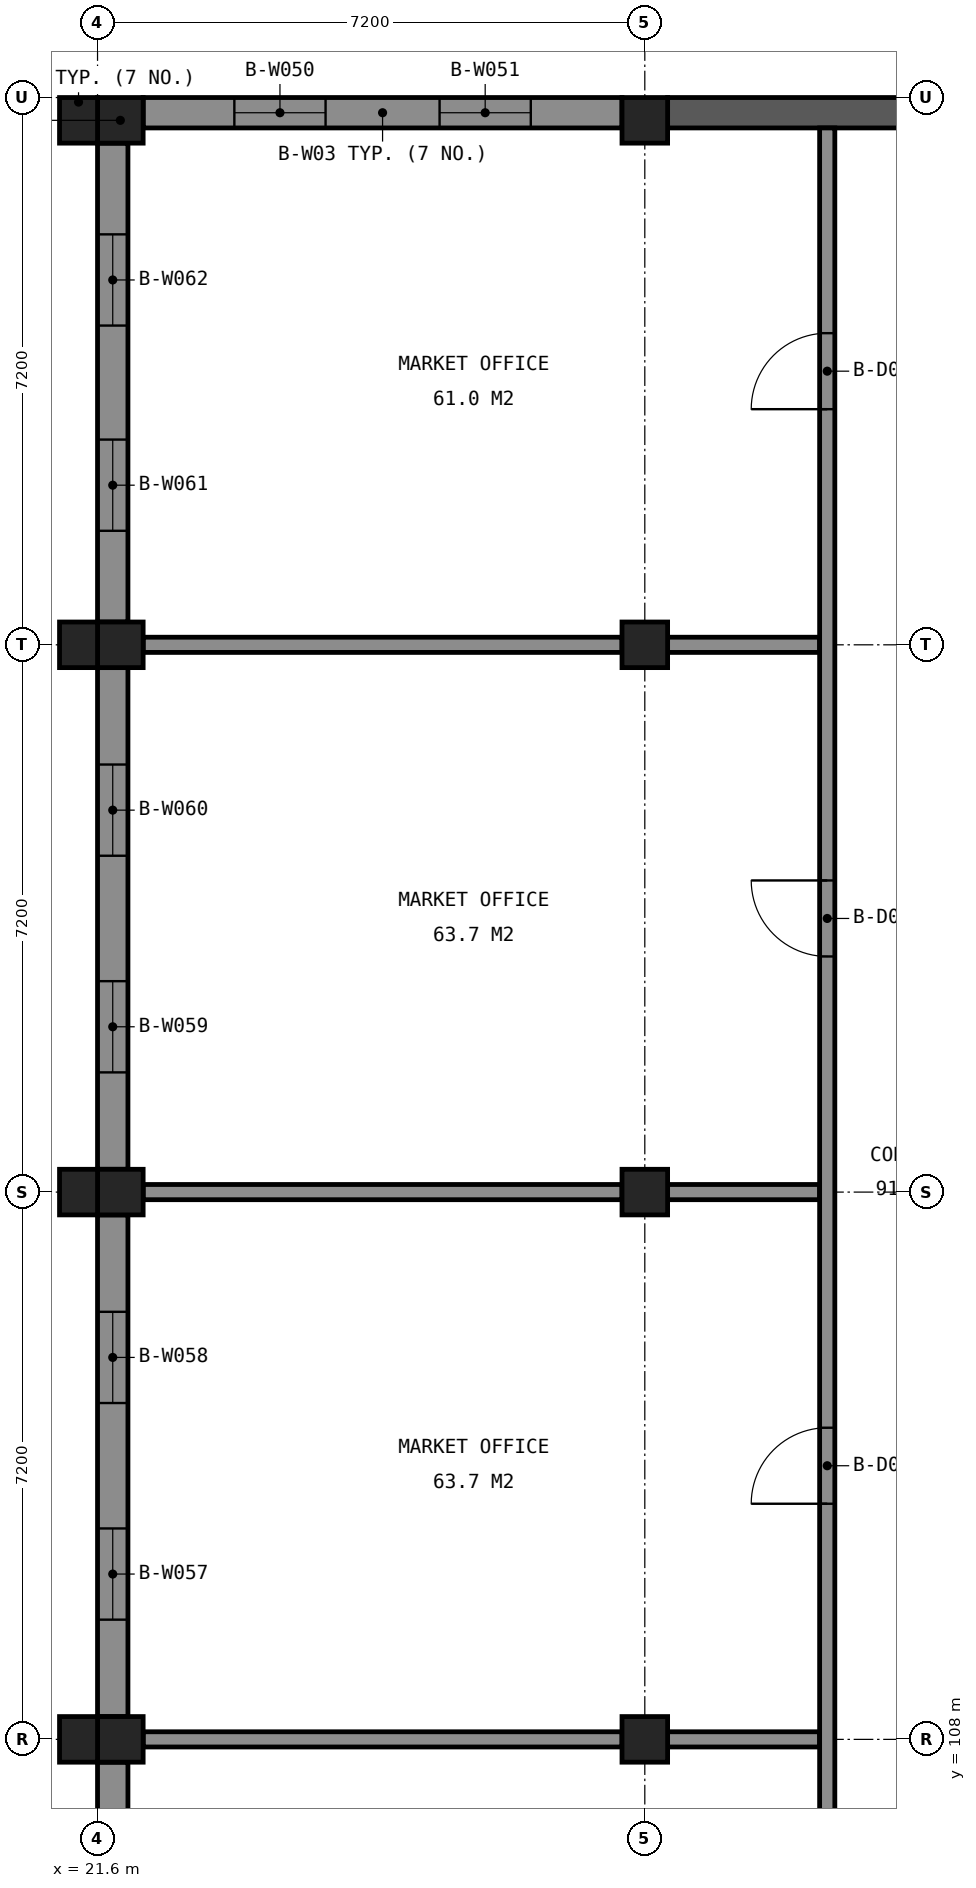
"""IFC4 building model, lengths in metres.
Left out: names, types, materials, properties, quantities, classifications, styles, units other than length and angle.
Written with IfcOpenShell. Run it as: python <this file> out.ifc"""

import sys

from ifc_helpers import new_model, si_unit, direction, frame, frame_2d, origin, origin_2d, place, context, subcontext, project, spatial, rectangle, extrude, element, fill, save


model = new_model("IFC4")
c1 = context("Model", 3, precision=1e-05, world=origin(), true_north=direction((0.0, 1.0)))
c2 = subcontext(c1, "Body", "Model", "MODEL_VIEW")
j1 = project(units=[si_unit("LENGTHUNIT", "METRE"), si_unit("PLANEANGLEUNIT", "RADIAN")], contexts=[c1])
p1 = place(None, origin())
s1 = spatial("IfcSite", under=j1, at=p1, CompositionType="ELEMENT")
p2 = place(p1, origin())
s2 = spatial("IfcBuilding", under=s1, at=p2, CompositionType="ELEMENT")
p3 = place(p2, frame((0.0, 0.0, 14.4)))
s3 = spatial("IfcBuildingStorey", under=s2, at=p3, CompositionType="ELEMENT", Elevation=14.4)
for number, where, z_axis, x_axis in (
    (1, (21.9, 129.3, 0.0), (0.0, 0.0, 1.0), (1.0, 0.0, 0.0)),
    (2, (21.9, 122.4, 0.0), (0.0, 0.0, 1.0), (1.0, 0.0, 0.0)),
    (3, (21.9, 115.2, 0.0), (0.0, 0.0, 1.0), (1.0, 0.0, 0.0)),
    (4, (21.9, 108.0, 0.0), (0.0, 0.0, 1.0), (1.0, 0.0, 0.0)),
    (5, (28.8, 129.3, 0.0), (0.0, 0.0, 1.0), (1.0, 0.0, 0.0)),
):
    element("IfcColumn", number, at=place(p3, frame(where, z_axis=z_axis, x_axis=x_axis)), inside=s3, PredefinedType="COLUMN", context=c2, shape_type="SweptSolid", body=[
        extrude(rectangle(XDim=0.6, YDim=0.6, at=origin_2d()), origin(), (0.0, 0.0, 1.0), 4.138),
    ])
for number, where, z_axis, x_axis in (
    (6, (28.8, 122.4, 0.0), (0.0, 0.0, 1.0), (1.0, 0.0, 0.0)),
    (7, (28.8, 115.2, 0.0), (0.0, 0.0, 1.0), (1.0, 0.0, 0.0)),
    (8, (28.8, 108.0, 0.0), (0.0, 0.0, 1.0), (1.0, 0.0, 0.0)),
):
    element("IfcColumn", number, at=place(p3, frame(where, z_axis=z_axis, x_axis=x_axis)), inside=s3, PredefinedType="COLUMN", context=c2, shape_type="SweptSolid", body=[
        extrude(rectangle(XDim=0.6, YDim=0.6, at=origin_2d()), origin(), (0.0, 0.0, 1.0), 4.713),
    ])
p4 = place(p3, frame((29.1, 129.4, 0.0), z_axis=(0.0, 0.0, 1.0), x_axis=(1.0, 0.0, 0.0)))
e9 = element("IfcWall", 9, at=p4, inside=s3, PredefinedType="SHEAR", context=c2, shape_type="SweptSolid", body=[
    extrude(rectangle(XDim=13.7, YDim=0.4, at=frame_2d((6.85, 0.0))), origin(), (0.0, 0.0, 1.0), 3.9),
])
p5 = place(p3, frame((22.2, 129.4, 0.0), z_axis=(0.0, 0.0, 1.0), x_axis=(1.0, 0.0, 0.0)))
e10 = element("IfcWall", 10, at=p5, inside=s3, PredefinedType="SOLIDWALL", context=c2, shape_type="SweptSolid", body=[
    extrude(rectangle(XDim=6.3, YDim=0.4, at=frame_2d((3.15, 0.0))), origin(), (0.0, 0.0, 1.0), 4.129),
])
p6 = place(p5, frame((1.2, 0.0, 1.6)))
e11 = element("IfcOpeningElement", 11, at=p6, cuts=e10, PredefinedType="OPENING", context=c2, shape_type="SweptSolid", body=[
    extrude(rectangle(XDim=1.2, YDim=1.2, at=frame_2d((0.6, 0.6))), frame((0.0, 0.21, 0.0), z_axis=(0.0, -1.0, 0.0), x_axis=(1.0, 0.0, 0.0)), (0.0, 0.0, 1.0), 0.42),
])
p7 = place(p5, frame((3.9, 0.0, 1.6)))
e12 = element("IfcOpeningElement", 12, at=p7, cuts=e10, PredefinedType="OPENING", context=c2, shape_type="SweptSolid", body=[
    extrude(rectangle(XDim=1.2, YDim=1.2, at=frame_2d((0.6, 0.6))), frame((0.0, 0.21, 0.0), z_axis=(0.0, -1.0, 0.0), x_axis=(1.0, 0.0, 0.0)), (0.0, 0.0, 1.0), 0.42),
])
p8 = place(p3, frame((21.8, 101.1, 0.0), z_axis=(0.0, 0.0, 1.0), x_axis=(0.0, 1.0, 0.0)))
e13 = element("IfcWall", 13, at=p8, inside=s3, PredefinedType="SOLIDWALL", context=c2, shape_type="SweptSolid", body=[
    extrude(rectangle(XDim=6.6, YDim=0.4, at=frame_2d((3.3, 0.0))), origin(), (0.0, 0.0, 1.0), 4.129),
])
p9 = place(p8, frame((1.275, 0.0, 1.6)))
e14 = element("IfcOpeningElement", 14, at=p9, cuts=e13, PredefinedType="OPENING", context=c2, shape_type="SweptSolid", body=[
    extrude(rectangle(XDim=1.2, YDim=1.2, at=frame_2d((0.6, 0.6))), frame((0.0, 0.21, 0.0), z_axis=(0.0, -1.0, 0.0), x_axis=(1.0, 0.0, 0.0)), (0.0, 0.0, 1.0), 0.42),
])
p10 = place(p8, frame((4.125, 0.0, 1.6)))
e15 = element("IfcOpeningElement", 15, at=p10, cuts=e13, PredefinedType="OPENING", context=c2, shape_type="SweptSolid", body=[
    extrude(rectangle(XDim=1.2, YDim=1.2, at=frame_2d((0.6, 0.6))), frame((0.0, 0.21, 0.0), z_axis=(0.0, -1.0, 0.0), x_axis=(1.0, 0.0, 0.0)), (0.0, 0.0, 1.0), 0.42),
])
p11 = place(p3, frame((21.8, 108.3, 0.0), z_axis=(0.0, 0.0, 1.0), x_axis=(0.0, 1.0, 0.0)))
e16 = element("IfcWall", 16, at=p11, inside=s3, PredefinedType="SOLIDWALL", context=c2, shape_type="SweptSolid", body=[
    extrude(rectangle(XDim=6.6, YDim=0.4, at=frame_2d((3.3, 0.0))), origin(), (0.0, 0.0, 1.0), 4.129),
])
p12 = place(p11, frame((1.275, 0.0, 1.6)))
e17 = element("IfcOpeningElement", 17, at=p12, cuts=e16, PredefinedType="OPENING", context=c2, shape_type="SweptSolid", body=[
    extrude(rectangle(XDim=1.2, YDim=1.2, at=frame_2d((0.6, 0.6))), frame((0.0, 0.21, 0.0), z_axis=(0.0, -1.0, 0.0), x_axis=(1.0, 0.0, 0.0)), (0.0, 0.0, 1.0), 0.42),
])
p13 = place(p11, frame((4.125, 0.0, 1.6)))
e18 = element("IfcOpeningElement", 18, at=p13, cuts=e16, PredefinedType="OPENING", context=c2, shape_type="SweptSolid", body=[
    extrude(rectangle(XDim=1.2, YDim=1.2, at=frame_2d((0.6, 0.6))), frame((0.0, 0.21, 0.0), z_axis=(0.0, -1.0, 0.0), x_axis=(1.0, 0.0, 0.0)), (0.0, 0.0, 1.0), 0.42),
])
p14 = place(p3, frame((21.8, 115.5, 0.0), z_axis=(0.0, 0.0, 1.0), x_axis=(0.0, 1.0, 0.0)))
e19 = element("IfcWall", 19, at=p14, inside=s3, PredefinedType="SOLIDWALL", context=c2, shape_type="SweptSolid", body=[
    extrude(rectangle(XDim=6.6, YDim=0.4, at=frame_2d((3.3, 0.0))), origin(), (0.0, 0.0, 1.0), 4.129),
])
p15 = place(p14, frame((1.275, 0.0, 1.6)))
e20 = element("IfcOpeningElement", 20, at=p15, cuts=e19, PredefinedType="OPENING", context=c2, shape_type="SweptSolid", body=[
    extrude(rectangle(XDim=1.2, YDim=1.2, at=frame_2d((0.6, 0.6))), frame((0.0, 0.21, 0.0), z_axis=(0.0, -1.0, 0.0), x_axis=(1.0, 0.0, 0.0)), (0.0, 0.0, 1.0), 0.42),
])
p16 = place(p14, frame((4.125, 0.0, 1.6)))
e21 = element("IfcOpeningElement", 21, at=p16, cuts=e19, PredefinedType="OPENING", context=c2, shape_type="SweptSolid", body=[
    extrude(rectangle(XDim=1.2, YDim=1.2, at=frame_2d((0.6, 0.6))), frame((0.0, 0.21, 0.0), z_axis=(0.0, -1.0, 0.0), x_axis=(1.0, 0.0, 0.0)), (0.0, 0.0, 1.0), 0.42),
])
p17 = place(p3, frame((21.8, 122.7, 0.0), z_axis=(0.0, 0.0, 1.0), x_axis=(0.0, 1.0, 0.0)))
e22 = element("IfcWall", 22, at=p17, inside=s3, PredefinedType="SOLIDWALL", context=c2, shape_type="SweptSolid", body=[
    extrude(rectangle(XDim=6.3, YDim=0.4, at=frame_2d((3.15, 0.0))), origin(), (0.0, 0.0, 1.0), 4.129),
])
p18 = place(p17, frame((1.2, 0.0, 1.6)))
e23 = element("IfcOpeningElement", 23, at=p18, cuts=e22, PredefinedType="OPENING", context=c2, shape_type="SweptSolid", body=[
    extrude(rectangle(XDim=1.2, YDim=1.2, at=frame_2d((0.6, 0.6))), frame((0.0, 0.21, 0.0), z_axis=(0.0, -1.0, 0.0), x_axis=(1.0, 0.0, 0.0)), (0.0, 0.0, 1.0), 0.42),
])
p19 = place(p17, frame((3.9, 0.0, 1.6)))
e24 = element("IfcOpeningElement", 24, at=p19, cuts=e22, PredefinedType="OPENING", context=c2, shape_type="SweptSolid", body=[
    extrude(rectangle(XDim=1.2, YDim=1.2, at=frame_2d((0.6, 0.6))), frame((0.0, 0.21, 0.0), z_axis=(0.0, -1.0, 0.0), x_axis=(1.0, 0.0, 0.0)), (0.0, 0.0, 1.0), 0.42),
])
for number, where, z_axis, x_axis in (
    (25, (21.35, 108.0, 0.0), (0.0, 0.0, 1.0), (1.0, 0.0, 0.0)),
    (26, (21.35, 115.2, 0.0), (0.0, 0.0, 1.0), (1.0, 0.0, 0.0)),
    (27, (21.35, 122.4, 0.0), (0.0, 0.0, 1.0), (1.0, 0.0, 0.0)),
    (28, (21.35, 129.3, 0.0), (0.0, 0.0, 1.0), (1.0, 0.0, 0.0)),
):
    element("IfcColumn", number, at=place(p3, frame(where, z_axis=z_axis, x_axis=x_axis)), inside=s3, PredefinedType="COLUMN", context=c2, shape_type="SweptSolid", body=[
        extrude(rectangle(XDim=0.5, YDim=0.6, at=origin_2d()), origin(), (0.0, 0.0, 1.0), 3.8),
    ])
p20 = place(p3, frame((22.2, 108.0, 0.0), z_axis=(0.0, 0.0, 1.0), x_axis=(1.0, 0.0, 0.0)))
e29 = element("IfcWall", 29, at=p20, inside=s3, PredefinedType="PARTITIONING", context=c2, shape_type="SweptSolid", body=[
    extrude(rectangle(XDim=6.3, YDim=0.2, at=frame_2d((3.15, 0.0))), origin(), (0.0, 0.0, 1.0), 4.0),
])
p21 = place(p3, frame((29.1, 108.0, 0.0), z_axis=(0.0, 0.0, 1.0), x_axis=(1.0, 0.0, 0.0)))
e30 = element("IfcWall", 30, at=p21, inside=s3, PredefinedType="PARTITIONING", context=c2, shape_type="SweptSolid", body=[
    extrude(rectangle(XDim=2.0, YDim=0.2, at=frame_2d((1.0, 0.0))), origin(), (0.0, 0.0, 1.0), 4.0),
])
p22 = place(p3, frame((22.2, 115.2, 0.0), z_axis=(0.0, 0.0, 1.0), x_axis=(1.0, 0.0, 0.0)))
e31 = element("IfcWall", 31, at=p22, inside=s3, PredefinedType="PARTITIONING", context=c2, shape_type="SweptSolid", body=[
    extrude(rectangle(XDim=6.3, YDim=0.2, at=frame_2d((3.15, 0.0))), origin(), (0.0, 0.0, 1.0), 4.0),
])
p23 = place(p3, frame((29.1, 115.2, 0.0), z_axis=(0.0, 0.0, 1.0), x_axis=(1.0, 0.0, 0.0)))
e32 = element("IfcWall", 32, at=p23, inside=s3, PredefinedType="PARTITIONING", context=c2, shape_type="SweptSolid", body=[
    extrude(rectangle(XDim=2.0, YDim=0.2, at=frame_2d((1.0, 0.0))), origin(), (0.0, 0.0, 1.0), 4.0),
])
p24 = place(p3, frame((22.2, 122.4, 0.0), z_axis=(0.0, 0.0, 1.0), x_axis=(1.0, 0.0, 0.0)))
e33 = element("IfcWall", 33, at=p24, inside=s3, PredefinedType="PARTITIONING", context=c2, shape_type="SweptSolid", body=[
    extrude(rectangle(XDim=6.3, YDim=0.2, at=frame_2d((3.15, 0.0))), origin(), (0.0, 0.0, 1.0), 4.0),
])
p25 = place(p3, frame((29.1, 122.4, 0.0), z_axis=(0.0, 0.0, 1.0), x_axis=(1.0, 0.0, 0.0)))
e34 = element("IfcWall", 34, at=p25, inside=s3, PredefinedType="PARTITIONING", context=c2, shape_type="SweptSolid", body=[
    extrude(rectangle(XDim=2.0, YDim=0.2, at=frame_2d((1.0, 0.0))), origin(), (0.0, 0.0, 1.0), 4.0),
])
p26 = place(p3, frame((31.2, 86.8, 0.0), z_axis=(0.0, 0.0, 1.0), x_axis=(0.0, 1.0, 0.0)))
e35 = element("IfcWall", 35, at=p26, inside=s3, PredefinedType="PARTITIONING", context=c2, shape_type="SweptSolid", body=[
    extrude(rectangle(XDim=42.4, YDim=0.2, at=frame_2d((21.2, 0.0))), origin(), (0.0, 0.0, 1.0), 4.0),
])
p27 = place(p26, frame((38.7, 0.0, 0.0)))
e36 = element("IfcOpeningElement", 36, at=p27, cuts=e35, PredefinedType="OPENING", context=c2, shape_type="SweptSolid", body=[
    extrude(rectangle(XDim=1.0, YDim=2.1, at=frame_2d((0.5, 1.05))), frame((0.0, 0.11, 0.0), z_axis=(0.0, -1.0, 0.0), x_axis=(1.0, 0.0, 0.0)), (0.0, 0.0, 1.0), 0.22),
])
p28 = place(p26, frame((31.5, 0.0, 0.0)))
e37 = element("IfcOpeningElement", 37, at=p28, cuts=e35, PredefinedType="OPENING", context=c2, shape_type="SweptSolid", body=[
    extrude(rectangle(XDim=1.0, YDim=2.1, at=frame_2d((0.5, 1.05))), frame((0.0, 0.11, 0.0), z_axis=(0.0, -1.0, 0.0), x_axis=(1.0, 0.0, 0.0)), (0.0, 0.0, 1.0), 0.22),
])
p29 = place(p26, frame((24.3, 0.0, 0.0)))
e38 = element("IfcOpeningElement", 38, at=p29, cuts=e35, PredefinedType="OPENING", context=c2, shape_type="SweptSolid", body=[
    extrude(rectangle(XDim=1.0, YDim=2.1, at=frame_2d((0.5, 1.05))), frame((0.0, 0.11, 0.0), z_axis=(0.0, -1.0, 0.0), x_axis=(1.0, 0.0, 0.0)), (0.0, 0.0, 1.0), 0.22),
])
p30 = place(p26, frame((16.5, 0.0, 0.0)))
e39 = element("IfcOpeningElement", 39, at=p30, cuts=e35, PredefinedType="OPENING", context=c2, shape_type="SweptSolid", body=[
    extrude(rectangle(XDim=1.0, YDim=2.1, at=frame_2d((0.5, 1.05))), frame((0.0, 0.11, 0.0), z_axis=(0.0, -1.0, 0.0), x_axis=(1.0, 0.0, 0.0)), (0.0, 0.0, 1.0), 0.22),
])
p31 = place(p26, frame((9.3, 0.0, 0.0)))
e40 = element("IfcOpeningElement", 40, at=p31, cuts=e35, PredefinedType="OPENING", context=c2, shape_type="SweptSolid", body=[
    extrude(rectangle(XDim=1.0, YDim=2.1, at=frame_2d((0.5, 1.05))), frame((0.0, 0.11, 0.0), z_axis=(0.0, -1.0, 0.0), x_axis=(1.0, 0.0, 0.0)), (0.0, 0.0, 1.0), 0.22),
])
p32 = place(p26, frame((2.7, 0.0, 0.0)))
e41 = element("IfcOpeningElement", 41, at=p32, cuts=e35, PredefinedType="OPENING", context=c2, shape_type="SweptSolid", body=[
    extrude(rectangle(XDim=1.0, YDim=2.1, at=frame_2d((0.5, 1.05))), frame((0.0, 0.11, 0.0), z_axis=(0.0, -1.0, 0.0), x_axis=(1.0, 0.0, 0.0)), (0.0, 0.0, 1.0), 0.22),
])
p33 = place(p6, origin())
e42 = element("IfcWindow", 42, at=p33, inside=s3, PartitioningType="SINGLE_PANEL", PredefinedType="WINDOW", context=c2, shape_type="SweptSolid", body=[
    extrude(rectangle(XDim=1.2, YDim=1.2, at=frame_2d((0.6, 0.6))), frame((0.0, 0.03, 0.0), z_axis=(0.0, -1.0, 0.0), x_axis=(1.0, 0.0, 0.0)), (0.0, 0.0, 1.0), 0.06),
])
fill(e11, e42)
p34 = place(p7, origin())
e43 = element("IfcWindow", 43, at=p34, inside=s3, PartitioningType="SINGLE_PANEL", PredefinedType="WINDOW", context=c2, shape_type="SweptSolid", body=[
    extrude(rectangle(XDim=1.2, YDim=1.2, at=frame_2d((0.6, 0.6))), frame((0.0, 0.03, 0.0), z_axis=(0.0, -1.0, 0.0), x_axis=(1.0, 0.0, 0.0)), (0.0, 0.0, 1.0), 0.06),
])
fill(e12, e43)
p35 = place(p12, origin())
e44 = element("IfcWindow", 44, at=p35, inside=s3, PartitioningType="SINGLE_PANEL", PredefinedType="WINDOW", context=c2, shape_type="SweptSolid", body=[
    extrude(rectangle(XDim=1.2, YDim=1.2, at=frame_2d((0.6, 0.6))), frame((0.0, 0.03, 0.0), z_axis=(0.0, -1.0, 0.0), x_axis=(1.0, 0.0, 0.0)), (0.0, 0.0, 1.0), 0.06),
])
fill(e17, e44)
p36 = place(p13, origin())
e45 = element("IfcWindow", 45, at=p36, inside=s3, PartitioningType="SINGLE_PANEL", PredefinedType="WINDOW", context=c2, shape_type="SweptSolid", body=[
    extrude(rectangle(XDim=1.2, YDim=1.2, at=frame_2d((0.6, 0.6))), frame((0.0, 0.03, 0.0), z_axis=(0.0, -1.0, 0.0), x_axis=(1.0, 0.0, 0.0)), (0.0, 0.0, 1.0), 0.06),
])
fill(e18, e45)
p37 = place(p15, origin())
e46 = element("IfcWindow", 46, at=p37, inside=s3, PartitioningType="SINGLE_PANEL", PredefinedType="WINDOW", context=c2, shape_type="SweptSolid", body=[
    extrude(rectangle(XDim=1.2, YDim=1.2, at=frame_2d((0.6, 0.6))), frame((0.0, 0.03, 0.0), z_axis=(0.0, -1.0, 0.0), x_axis=(1.0, 0.0, 0.0)), (0.0, 0.0, 1.0), 0.06),
])
fill(e20, e46)
p38 = place(p16, origin())
e47 = element("IfcWindow", 47, at=p38, inside=s3, PartitioningType="SINGLE_PANEL", PredefinedType="WINDOW", context=c2, shape_type="SweptSolid", body=[
    extrude(rectangle(XDim=1.2, YDim=1.2, at=frame_2d((0.6, 0.6))), frame((0.0, 0.03, 0.0), z_axis=(0.0, -1.0, 0.0), x_axis=(1.0, 0.0, 0.0)), (0.0, 0.0, 1.0), 0.06),
])
fill(e21, e47)
p39 = place(p18, origin())
e48 = element("IfcWindow", 48, at=p39, inside=s3, PartitioningType="SINGLE_PANEL", PredefinedType="WINDOW", context=c2, shape_type="SweptSolid", body=[
    extrude(rectangle(XDim=1.2, YDim=1.2, at=frame_2d((0.6, 0.6))), frame((0.0, 0.03, 0.0), z_axis=(0.0, -1.0, 0.0), x_axis=(1.0, 0.0, 0.0)), (0.0, 0.0, 1.0), 0.06),
])
fill(e23, e48)
p40 = place(p19, origin())
e49 = element("IfcWindow", 49, at=p40, inside=s3, PartitioningType="SINGLE_PANEL", PredefinedType="WINDOW", context=c2, shape_type="SweptSolid", body=[
    extrude(rectangle(XDim=1.2, YDim=1.2, at=frame_2d((0.6, 0.6))), frame((0.0, 0.03, 0.0), z_axis=(0.0, -1.0, 0.0), x_axis=(1.0, 0.0, 0.0)), (0.0, 0.0, 1.0), 0.06),
])
fill(e24, e49)
p41 = place(p27, origin())
e50 = element("IfcDoor", 50, at=p41, inside=s3, OperationType="SINGLE_SWING_LEFT", PredefinedType="DOOR", context=c2, shape_type="SweptSolid", body=[
    extrude(rectangle(XDim=1.0, YDim=2.1, at=frame_2d((0.5, 1.05))), frame((0.0, 0.025, 0.0), z_axis=(0.0, -1.0, 0.0), x_axis=(1.0, 0.0, 0.0)), (0.0, 0.0, 1.0), 0.05),
])
fill(e36, e50)
p42 = place(p28, origin())
e51 = element("IfcDoor", 51, at=p42, inside=s3, OperationType="SINGLE_SWING_RIGHT", PredefinedType="DOOR", context=c2, shape_type="SweptSolid", body=[
    extrude(rectangle(XDim=1.0, YDim=2.1, at=frame_2d((0.5, 1.05))), frame((0.0, 0.025, 0.0), z_axis=(0.0, -1.0, 0.0), x_axis=(1.0, 0.0, 0.0)), (0.0, 0.0, 1.0), 0.05),
])
fill(e37, e51)
p43 = place(p29, origin())
e52 = element("IfcDoor", 52, at=p43, inside=s3, OperationType="SINGLE_SWING_LEFT", PredefinedType="DOOR", context=c2, shape_type="SweptSolid", body=[
    extrude(rectangle(XDim=1.0, YDim=2.1, at=frame_2d((0.5, 1.05))), frame((0.0, 0.025, 0.0), z_axis=(0.0, -1.0, 0.0), x_axis=(1.0, 0.0, 0.0)), (0.0, 0.0, 1.0), 0.05),
])
fill(e38, e52)
save(model, sys.argv[1])
